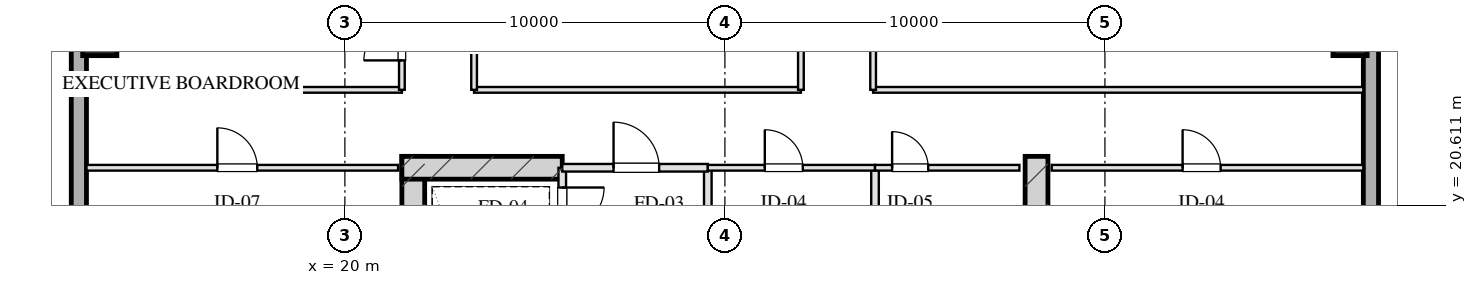
"""IFC4 building model, lengths in metres.
Left out: names, types, materials, properties, quantities, classifications, styles, units other than length and angle.
Written with IfcOpenShell. Run it as: python <this file> out.ifc"""

import sys

from ifc_helpers import new_model, si_unit, direction, frame, frame_2d, origin, origin_2d, place, context, subcontext, project, spatial, rectangle, hollow_rectangle, extrude, element, fill, save


model = new_model("IFC4")
c1 = context("Model", 3, precision=1e-05, world=origin(), true_north=direction((0.0, 1.0)))
c2 = subcontext(c1, "Body", "Model", "MODEL_VIEW")
j1 = project(units=[si_unit("LENGTHUNIT", "METRE"), si_unit("PLANEANGLEUNIT", "RADIAN")], contexts=[c1])
p1 = place(None, origin())
s1 = spatial("IfcSite", under=j1, at=p1, CompositionType="ELEMENT")
p2 = place(p1, origin())
s2 = spatial("IfcBuilding", under=s1, at=p2, CompositionType="ELEMENT")
p3 = place(p2, frame((0.0, 0.0, 166.75)))
s3 = spatial("IfcBuildingStorey", under=s2, at=p3, CompositionType="ELEMENT", Elevation=166.75)
for number, where, z_axis, x_axis in (
    (1, (21.8, 21.9, 0.0), (0.0, 0.0, 1.0), (0.0, -1.0, 0.0)),
    (2, (38.2, 21.9, 0.0), (0.0, 0.0, 1.0), (0.0, -1.0, 0.0)),
):
    element("IfcWall", number, at=place(p3, frame(where, z_axis=z_axis, x_axis=x_axis)), inside=s3, PredefinedType="SHEAR", context=c2, shape_type="SweptSolid", body=[
        extrude(rectangle(XDim=9.48, YDim=0.6, at=frame_2d((4.74, 0.0))), origin(), (0.0, 0.0, 1.0), 3.45),
    ])
p4 = place(p3, frame((21.5, 21.6, 0.0), z_axis=(0.0, 0.0, 1.0), x_axis=(1.0, 0.0, 0.0)))
e3 = element("IfcWall", 3, at=p4, inside=s3, PredefinedType="SHEAR", context=c2, shape_type="SweptSolid", body=[
    extrude(rectangle(XDim=4.22, YDim=0.6, at=frame_2d((2.11, 0.0))), origin(), (0.0, 0.0, 1.0), 3.45),
])
for number, where, z_axis, x_axis in (
    (4, (13.55, 25.0, 0.0), (0.0, 0.0, 1.0), (1.0, 0.0, 0.0)),
    (5, (46.45, 25.0, 0.0), (0.0, 0.0, 1.0), (1.0, 0.0, 0.0)),
):
    element("IfcColumn", number, at=place(p3, frame(where, z_axis=z_axis, x_axis=x_axis)), inside=s3, PredefinedType="COLUMN", context=c2, shape_type="SweptSolid", body=[
        extrude(hollow_rectangle(XDim=0.9, YDim=0.9, WallThickness=0.032, at=origin_2d()), origin(), (0.0, 0.0, 1.0), 3.451),
    ])
p5 = place(p3, frame((13.0, 10.8, 0.0), z_axis=(0.0, 0.0, 1.0), x_axis=(0.0, 1.0, 0.0)))
e6 = element("IfcWall", 6, at=p5, inside=s3, PredefinedType="SOLIDWALL", context=c2, shape_type="SweptSolid", body=[
    extrude(rectangle(XDim=46.4, YDim=0.4, at=frame_2d((23.2, 0.0))), origin(), (0.0, 0.0, 1.0), 2.61),
])
p6 = place(p5, frame((16.85, 0.0, 0.0)))
e7 = element("IfcOpeningElement", 7, at=p6, cuts=e6, PredefinedType="OPENING", context=c2, shape_type="SweptSolid", body=[
    extrude(rectangle(XDim=1.1, YDim=2.15, at=frame_2d((0.55, 1.075))), frame((0.0, 0.21, 0.0), z_axis=(0.0, -1.0, 0.0), x_axis=(1.0, 0.0, 0.0)), (0.0, 0.0, 1.0), 0.42),
])
p7 = place(p3, frame((47.0, 57.2, 0.0), z_axis=(0.0, 0.0, 1.0), x_axis=(0.0, -1.0, 0.0)))
e8 = element("IfcWall", 8, at=p7, inside=s3, PredefinedType="SOLIDWALL", context=c2, shape_type="SweptSolid", body=[
    extrude(rectangle(XDim=46.4, YDim=0.4, at=frame_2d((23.2, 0.0))), origin(), (0.0, 0.0, 1.0), 2.61),
])
p8 = place(p7, frame((25.596, 0.0, 0.0)))
e9 = element("IfcOpeningElement", 9, at=p8, cuts=e8, PredefinedType="OPENING", context=c2, shape_type="SweptSolid", body=[
    extrude(rectangle(XDim=1.1, YDim=2.15, at=frame_2d((0.55, 1.075))), frame((0.0, 0.21, 0.0), z_axis=(0.0, -1.0, 0.0), x_axis=(1.0, 0.0, 0.0)), (0.0, 0.0, 1.0), 0.42),
])
p9 = place(p3, frame((25.72, 21.6, 0.0), z_axis=(0.0, 0.0, 1.0), x_axis=(0.0, -1.0, 0.0)))
e10 = element("IfcWall", 10, at=p9, inside=s3, PredefinedType="PARTITIONING", context=c2, shape_type="SweptSolid", body=[
    extrude(rectangle(XDim=1.9, YDim=0.2, at=frame_2d((0.95, 0.0))), origin(), (0.0, 0.0, 1.0), 3.175),
])
p10 = place(p9, frame((0.52, 0.0, 0.0)))
e11 = element("IfcOpeningElement", 11, at=p10, cuts=e10, PredefinedType="OPENING", context=c2, shape_type="SweptSolid", body=[
    extrude(rectangle(XDim=1.1, YDim=2.05, at=frame_2d((0.55, 1.025))), frame((0.0, 0.11, 0.0), z_axis=(0.0, -1.0, 0.0), x_axis=(1.0, 0.0, 0.0)), (0.0, 0.0, 1.0), 0.22),
])
p11 = place(p3, frame((29.55, 21.6, 0.0), z_axis=(0.0, 0.0, 1.0), x_axis=(0.0, -1.0, 0.0)))
e12 = element("IfcWall", 12, at=p11, inside=s3, PredefinedType="PARTITIONING", context=c2, shape_type="SweptSolid", body=[
    extrude(rectangle(XDim=8.43, YDim=0.2, at=frame_2d((4.215, 0.0))), origin(), (0.0, 0.0, 1.0), 3.175),
])
p12 = place(p3, frame((25.72, 21.6, 0.0), z_axis=(0.0, 0.0, 1.0), x_axis=(1.0, 0.0, 0.0)))
e13 = element("IfcWall", 13, at=p12, inside=s3, PredefinedType="PARTITIONING", context=c2, shape_type="SweptSolid", body=[
    extrude(rectangle(XDim=3.83, YDim=0.2, at=frame_2d((1.915, 0.0))), origin(), (0.0, 0.0, 1.0), 3.175),
])
p13 = place(p12, frame((1.35, 0.0, 0.0)))
e14 = element("IfcOpeningElement", 14, at=p13, cuts=e13, PredefinedType="OPENING", context=c2, shape_type="SweptSolid", body=[
    extrude(rectangle(XDim=1.2, YDim=2.05, at=frame_2d((0.6, 1.025))), frame((0.0, 0.11, 0.0), z_axis=(0.0, -1.0, 0.0), x_axis=(1.0, 0.0, 0.0)), (0.0, 0.0, 1.0), 0.22),
])
p14 = place(p3, frame((33.95, 21.6, 0.0), z_axis=(0.0, 0.0, 1.0), x_axis=(0.0, -1.0, 0.0)))
e15 = element("IfcWall", 15, at=p14, inside=s3, PredefinedType="PARTITIONING", context=c2, shape_type="SweptSolid", body=[
    extrude(rectangle(XDim=8.43, YDim=0.2, at=frame_2d((4.215, 0.0))), origin(), (0.0, 0.0, 1.0), 3.175),
])
p15 = place(p3, frame((29.55, 21.6, 0.0), z_axis=(0.0, 0.0, 1.0), x_axis=(1.0, 0.0, 0.0)))
e16 = element("IfcWall", 16, at=p15, inside=s3, PredefinedType="PARTITIONING", context=c2, shape_type="SweptSolid", body=[
    extrude(rectangle(XDim=4.4, YDim=0.15, at=frame_2d((2.2, 0.0))), origin(), (0.0, 0.0, 1.0), 3.175),
])
p16 = place(p15, frame((1.5, 0.0, 0.0)))
e17 = element("IfcOpeningElement", 17, at=p16, cuts=e16, PredefinedType="OPENING", context=c2, shape_type="SweptSolid", body=[
    extrude(rectangle(XDim=1.0, YDim=2.05, at=frame_2d((0.5, 1.025))), frame((0.0, 0.085, 0.0), z_axis=(0.0, -1.0, 0.0), x_axis=(1.0, 0.0, 0.0)), (0.0, 0.0, 1.0), 0.17),
])
p17 = place(p3, frame((33.95, 21.6, 0.0), z_axis=(0.0, 0.0, 1.0), x_axis=(1.0, 0.0, 0.0)))
e18 = element("IfcWall", 18, at=p17, inside=s3, PredefinedType="PARTITIONING", context=c2, shape_type="SweptSolid", body=[
    extrude(rectangle(XDim=3.8, YDim=0.15, at=frame_2d((1.9, 0.0))), origin(), (0.0, 0.0, 1.0), 3.175),
])
p18 = place(p17, frame((0.45, 0.0, 0.0)))
e19 = element("IfcOpeningElement", 19, at=p18, cuts=e18, PredefinedType="OPENING", context=c2, shape_type="SweptSolid", body=[
    extrude(rectangle(XDim=0.95, YDim=2.05, at=frame_2d((0.475, 1.025))), frame((0.0, 0.085, 0.0), z_axis=(0.0, -1.0, 0.0), x_axis=(1.0, 0.0, 0.0)), (0.0, 0.0, 1.0), 0.17),
])
p19 = place(p3, frame((13.2, 21.6, 0.0), z_axis=(0.0, 0.0, 1.0), x_axis=(1.0, 0.0, 0.0)))
e20 = element("IfcWall", 20, at=p19, inside=s3, PredefinedType="PARTITIONING", context=c2, shape_type="SweptSolid", body=[
    extrude(rectangle(XDim=8.2, YDim=0.15, at=frame_2d((4.1, 0.0))), origin(), (0.0, 0.0, 1.0), 3.175),
])
p20 = place(p19, frame((3.444, 0.0, 0.0)))
e21 = element("IfcOpeningElement", 21, at=p20, cuts=e20, PredefinedType="OPENING", context=c2, shape_type="SweptSolid", body=[
    extrude(rectangle(XDim=1.05, YDim=2.05, at=frame_2d((0.525, 1.025))), frame((0.0, 0.085, 0.0), z_axis=(0.0, -1.0, 0.0), x_axis=(1.0, 0.0, 0.0)), (0.0, 0.0, 1.0), 0.17),
])
p21 = place(p3, frame((38.6, 21.6, 0.0), z_axis=(0.0, 0.0, 1.0), x_axis=(1.0, 0.0, 0.0)))
e22 = element("IfcWall", 22, at=p21, inside=s3, PredefinedType="PARTITIONING", context=c2, shape_type="SweptSolid", body=[
    extrude(rectangle(XDim=8.2, YDim=0.15, at=frame_2d((4.1, 0.0))), origin(), (0.0, 0.0, 1.0), 3.175),
])
p22 = place(p21, frame((3.444, 0.0, 0.0)))
e23 = element("IfcOpeningElement", 23, at=p22, cuts=e22, PredefinedType="OPENING", context=c2, shape_type="SweptSolid", body=[
    extrude(rectangle(XDim=1.0, YDim=2.05, at=frame_2d((0.5, 1.025))), frame((0.0, 0.085, 0.0), z_axis=(0.0, -1.0, 0.0), x_axis=(1.0, 0.0, 0.0)), (0.0, 0.0, 1.0), 0.17),
])
p23 = place(p3, frame((13.2, 23.65, 0.0), z_axis=(0.0, 0.0, 1.0), x_axis=(1.0, 0.0, 0.0)))
e24 = element("IfcWall", 24, at=p23, inside=s3, PredefinedType="PARTITIONING", context=c2, shape_type="SweptSolid", body=[
    extrude(rectangle(XDim=8.3, YDim=0.15, at=frame_2d((4.15, 0.0))), origin(), (0.0, 0.0, 1.0), 3.175),
])
p24 = place(p3, frame((23.4, 23.65, 0.0), z_axis=(0.0, 0.0, 1.0), x_axis=(1.0, 0.0, 0.0)))
e25 = element("IfcWall", 25, at=p24, inside=s3, PredefinedType="PARTITIONING", context=c2, shape_type="SweptSolid", body=[
    extrude(rectangle(XDim=8.6, YDim=0.15, at=frame_2d((4.3, 0.0))), origin(), (0.0, 0.0, 1.0), 3.175),
])
p25 = place(p3, frame((33.9, 23.65, 0.0), z_axis=(0.0, 0.0, 1.0), x_axis=(1.0, 0.0, 0.0)))
e26 = element("IfcWall", 26, at=p25, inside=s3, PredefinedType="PARTITIONING", context=c2, shape_type="SweptSolid", body=[
    extrude(rectangle(XDim=12.9, YDim=0.15, at=frame_2d((6.45, 0.0))), origin(), (0.0, 0.0, 1.0), 3.175),
])
p26 = place(p3, frame((21.5, 23.65, 0.0), z_axis=(0.0, 0.0, 1.0), x_axis=(0.0, 1.0, 0.0)))
e27 = element("IfcWall", 27, at=p26, inside=s3, PredefinedType="PARTITIONING", context=c2, shape_type="SweptSolid", body=[
    extrude(rectangle(XDim=20.7, YDim=0.15, at=frame_2d((10.35, 0.0))), origin(), (0.0, 0.0, 1.0), 3.175),
])
p27 = place(p26, frame((0.775, 0.0, 0.0)))
e28 = element("IfcOpeningElement", 28, at=p27, cuts=e27, PredefinedType="OPENING", context=c2, shape_type="SweptSolid", body=[
    extrude(rectangle(XDim=1.0, YDim=2.05, at=frame_2d((0.5, 1.025))), frame((0.0, 0.085, 0.0), z_axis=(0.0, -1.0, 0.0), x_axis=(1.0, 0.0, 0.0)), (0.0, 0.0, 1.0), 0.17),
])
p28 = place(p26, frame((3.95, 0.0, 0.0)))
e29 = element("IfcOpeningElement", 29, at=p28, cuts=e27, PredefinedType="OPENING", context=c2, shape_type="SweptSolid", body=[
    extrude(rectangle(XDim=1.0, YDim=2.05, at=frame_2d((0.5, 1.025))), frame((0.0, 0.085, 0.0), z_axis=(0.0, -1.0, 0.0), x_axis=(1.0, 0.0, 0.0)), (0.0, 0.0, 1.0), 0.17),
])
p29 = place(p26, frame((7.51, 0.0, 0.0)))
e30 = element("IfcOpeningElement", 30, at=p29, cuts=e27, PredefinedType="OPENING", context=c2, shape_type="SweptSolid", body=[
    extrude(rectangle(XDim=1.0, YDim=2.05, at=frame_2d((0.5, 1.025))), frame((0.0, 0.085, 0.0), z_axis=(0.0, -1.0, 0.0), x_axis=(1.0, 0.0, 0.0)), (0.0, 0.0, 1.0), 0.17),
])
p30 = place(p26, frame((11.51, 0.0, 0.0)))
e31 = element("IfcOpeningElement", 31, at=p30, cuts=e27, PredefinedType="OPENING", context=c2, shape_type="SweptSolid", body=[
    extrude(rectangle(XDim=1.05, YDim=2.05, at=frame_2d((0.525, 1.025))), frame((0.0, 0.085, 0.0), z_axis=(0.0, -1.0, 0.0), x_axis=(1.0, 0.0, 0.0)), (0.0, 0.0, 1.0), 0.17),
])
p31 = place(p26, frame((15.75, 0.0, 0.0)))
e32 = element("IfcOpeningElement", 32, at=p31, cuts=e27, PredefinedType="OPENING", context=c2, shape_type="SweptSolid", body=[
    extrude(rectangle(XDim=0.85, YDim=2.05, at=frame_2d((0.425, 1.025))), frame((0.0, 0.085, 0.0), z_axis=(0.0, -1.0, 0.0), x_axis=(1.0, 0.0, 0.0)), (0.0, 0.0, 1.0), 0.17),
])
p32 = place(p26, frame((18.925, 0.0, 0.0)))
e33 = element("IfcOpeningElement", 33, at=p32, cuts=e27, PredefinedType="OPENING", context=c2, shape_type="SweptSolid", body=[
    extrude(rectangle(XDim=1.0, YDim=2.05, at=frame_2d((0.5, 1.025))), frame((0.0, 0.085, 0.0), z_axis=(0.0, -1.0, 0.0), x_axis=(1.0, 0.0, 0.0)), (0.0, 0.0, 1.0), 0.17),
])
p33 = place(p3, frame((23.4, 23.65, 0.0), z_axis=(0.0, 0.0, 1.0), x_axis=(0.0, 1.0, 0.0)))
e34 = element("IfcWall", 34, at=p33, inside=s3, PredefinedType="PARTITIONING", context=c2, shape_type="SweptSolid", body=[
    extrude(rectangle(XDim=20.7, YDim=0.15, at=frame_2d((10.35, 0.0))), origin(), (0.0, 0.0, 1.0), 3.175),
])
p34 = place(p33, frame((4.117, 0.0, 0.0)))
e35 = element("IfcOpeningElement", 35, at=p34, cuts=e34, PredefinedType="OPENING", context=c2, shape_type="SweptSolid", body=[
    extrude(rectangle(XDim=1.1, YDim=2.05, at=frame_2d((0.55, 1.025))), frame((0.0, 0.085, 0.0), z_axis=(0.0, -1.0, 0.0), x_axis=(1.0, 0.0, 0.0)), (0.0, 0.0, 1.0), 0.17),
])
p35 = place(p33, frame((14.347, 0.0, 0.0)))
e36 = element("IfcOpeningElement", 36, at=p35, cuts=e34, PredefinedType="OPENING", context=c2, shape_type="SweptSolid", body=[
    extrude(rectangle(XDim=1.1, YDim=2.05, at=frame_2d((0.55, 1.025))), frame((0.0, 0.085, 0.0), z_axis=(0.0, -1.0, 0.0), x_axis=(1.0, 0.0, 0.0)), (0.0, 0.0, 1.0), 0.17),
])
p36 = place(p3, frame((32.0, 23.65, 0.0), z_axis=(0.0, 0.0, 1.0), x_axis=(0.0, 1.0, 0.0)))
e37 = element("IfcWall", 37, at=p36, inside=s3, PredefinedType="PARTITIONING", context=c2, shape_type="SweptSolid", body=[
    extrude(rectangle(XDim=20.7, YDim=0.15, at=frame_2d((10.35, 0.0))), origin(), (0.0, 0.0, 1.0), 3.175),
])
p37 = place(p3, frame((33.9, 23.65, 0.0), z_axis=(0.0, 0.0, 1.0), x_axis=(0.0, 1.0, 0.0)))
e38 = element("IfcWall", 38, at=p37, inside=s3, PredefinedType="PARTITIONING", context=c2, shape_type="SweptSolid", body=[
    extrude(rectangle(XDim=20.7, YDim=0.15, at=frame_2d((10.35, 0.0))), origin(), (0.0, 0.0, 1.0), 3.175),
])
p38 = place(p37, frame((2.329, 0.0, 0.0)))
e39 = element("IfcOpeningElement", 39, at=p38, cuts=e38, PredefinedType="OPENING", context=c2, shape_type="SweptSolid", body=[
    extrude(rectangle(XDim=1.0, YDim=2.05, at=frame_2d((0.5, 1.025))), frame((0.0, 0.085, 0.0), z_axis=(0.0, -1.0, 0.0), x_axis=(1.0, 0.0, 0.0)), (0.0, 0.0, 1.0), 0.17),
])
p39 = place(p37, frame((8.104, 0.0, 0.0)))
e40 = element("IfcOpeningElement", 40, at=p39, cuts=e38, PredefinedType="OPENING", context=c2, shape_type="SweptSolid", body=[
    extrude(rectangle(XDim=1.0, YDim=2.05, at=frame_2d((0.5, 1.025))), frame((0.0, 0.085, 0.0), z_axis=(0.0, -1.0, 0.0), x_axis=(1.0, 0.0, 0.0)), (0.0, 0.0, 1.0), 0.17),
])
p40 = place(p37, frame((14.35, 0.0, 0.0)))
e41 = element("IfcOpeningElement", 41, at=p40, cuts=e38, PredefinedType="OPENING", context=c2, shape_type="SweptSolid", body=[
    extrude(rectangle(XDim=1.05, YDim=2.05, at=frame_2d((0.525, 1.025))), frame((0.0, 0.085, 0.0), z_axis=(0.0, -1.0, 0.0), x_axis=(1.0, 0.0, 0.0)), (0.0, 0.0, 1.0), 0.17),
])
p41 = place(p37, frame((18.925, 0.0, 0.0)))
e42 = element("IfcOpeningElement", 42, at=p41, cuts=e38, PredefinedType="OPENING", context=c2, shape_type="SweptSolid", body=[
    extrude(rectangle(XDim=1.0, YDim=2.05, at=frame_2d((0.5, 1.025))), frame((0.0, 0.085, 0.0), z_axis=(0.0, -1.0, 0.0), x_axis=(1.0, 0.0, 0.0)), (0.0, 0.0, 1.0), 0.17),
])
p42 = place(p10, origin())
e43 = element("IfcDoor", 43, at=p42, inside=s3, OperationType="SINGLE_SWING_LEFT", PredefinedType="DOOR", context=c2, shape_type="SweptSolid", body=[
    extrude(rectangle(XDim=1.1, YDim=2.05, at=frame_2d((0.55, 1.025))), frame((0.0, 0.025, 0.0), z_axis=(0.0, -1.0, 0.0), x_axis=(1.0, 0.0, 0.0)), (0.0, 0.0, 1.0), 0.05),
])
fill(e11, e43)
p43 = place(p13, origin())
e44 = element("IfcDoor", 44, at=p43, inside=s3, OperationType="SINGLE_SWING_LEFT", PredefinedType="DOOR", context=c2, shape_type="SweptSolid", body=[
    extrude(rectangle(XDim=1.2, YDim=2.05, at=frame_2d((0.6, 1.025))), frame((0.0, 0.025, 0.0), z_axis=(0.0, -1.0, 0.0), x_axis=(1.0, 0.0, 0.0)), (0.0, 0.0, 1.0), 0.05),
])
fill(e14, e44)
p44 = place(p16, origin())
e45 = element("IfcDoor", 45, at=p44, inside=s3, OperationType="SINGLE_SWING_LEFT", PredefinedType="DOOR", context=c2, shape_type="SweptSolid", body=[
    extrude(rectangle(XDim=1.0, YDim=2.05, at=frame_2d((0.5, 1.025))), frame((0.0, 0.025, 0.0), z_axis=(0.0, -1.0, 0.0), x_axis=(1.0, 0.0, 0.0)), (0.0, 0.0, 1.0), 0.05),
])
fill(e17, e45)
p45 = place(p18, origin())
e46 = element("IfcDoor", 46, at=p45, inside=s3, OperationType="SINGLE_SWING_LEFT", PredefinedType="DOOR", context=c2, shape_type="SweptSolid", body=[
    extrude(rectangle(XDim=0.95, YDim=2.05, at=frame_2d((0.475, 1.025))), frame((0.0, 0.025, 0.0), z_axis=(0.0, -1.0, 0.0), x_axis=(1.0, 0.0, 0.0)), (0.0, 0.0, 1.0), 0.05),
])
fill(e19, e46)
p46 = place(p20, origin())
e47 = element("IfcDoor", 47, at=p46, inside=s3, OperationType="SINGLE_SWING_LEFT", PredefinedType="DOOR", context=c2, shape_type="SweptSolid", body=[
    extrude(rectangle(XDim=1.05, YDim=2.05, at=frame_2d((0.525, 1.025))), frame((0.0, 0.025, 0.0), z_axis=(0.0, -1.0, 0.0), x_axis=(1.0, 0.0, 0.0)), (0.0, 0.0, 1.0), 0.05),
])
fill(e21, e47)
p47 = place(p22, origin())
e48 = element("IfcDoor", 48, at=p47, inside=s3, OperationType="SINGLE_SWING_LEFT", PredefinedType="DOOR", context=c2, shape_type="SweptSolid", body=[
    extrude(rectangle(XDim=1.0, YDim=2.05, at=frame_2d((0.5, 1.025))), frame((0.0, 0.025, 0.0), z_axis=(0.0, -1.0, 0.0), x_axis=(1.0, 0.0, 0.0)), (0.0, 0.0, 1.0), 0.05),
])
fill(e23, e48)
p48 = place(p27, origin())
e49 = element("IfcDoor", 49, at=p48, inside=s3, OperationType="SINGLE_SWING_LEFT", PredefinedType="DOOR", context=c2, shape_type="SweptSolid", body=[
    extrude(rectangle(XDim=1.0, YDim=2.05, at=frame_2d((0.5, 1.025))), frame((0.0, 0.025, 0.0), z_axis=(0.0, -1.0, 0.0), x_axis=(1.0, 0.0, 0.0)), (0.0, 0.0, 1.0), 0.05),
])
fill(e28, e49)
save(model, sys.argv[1])
